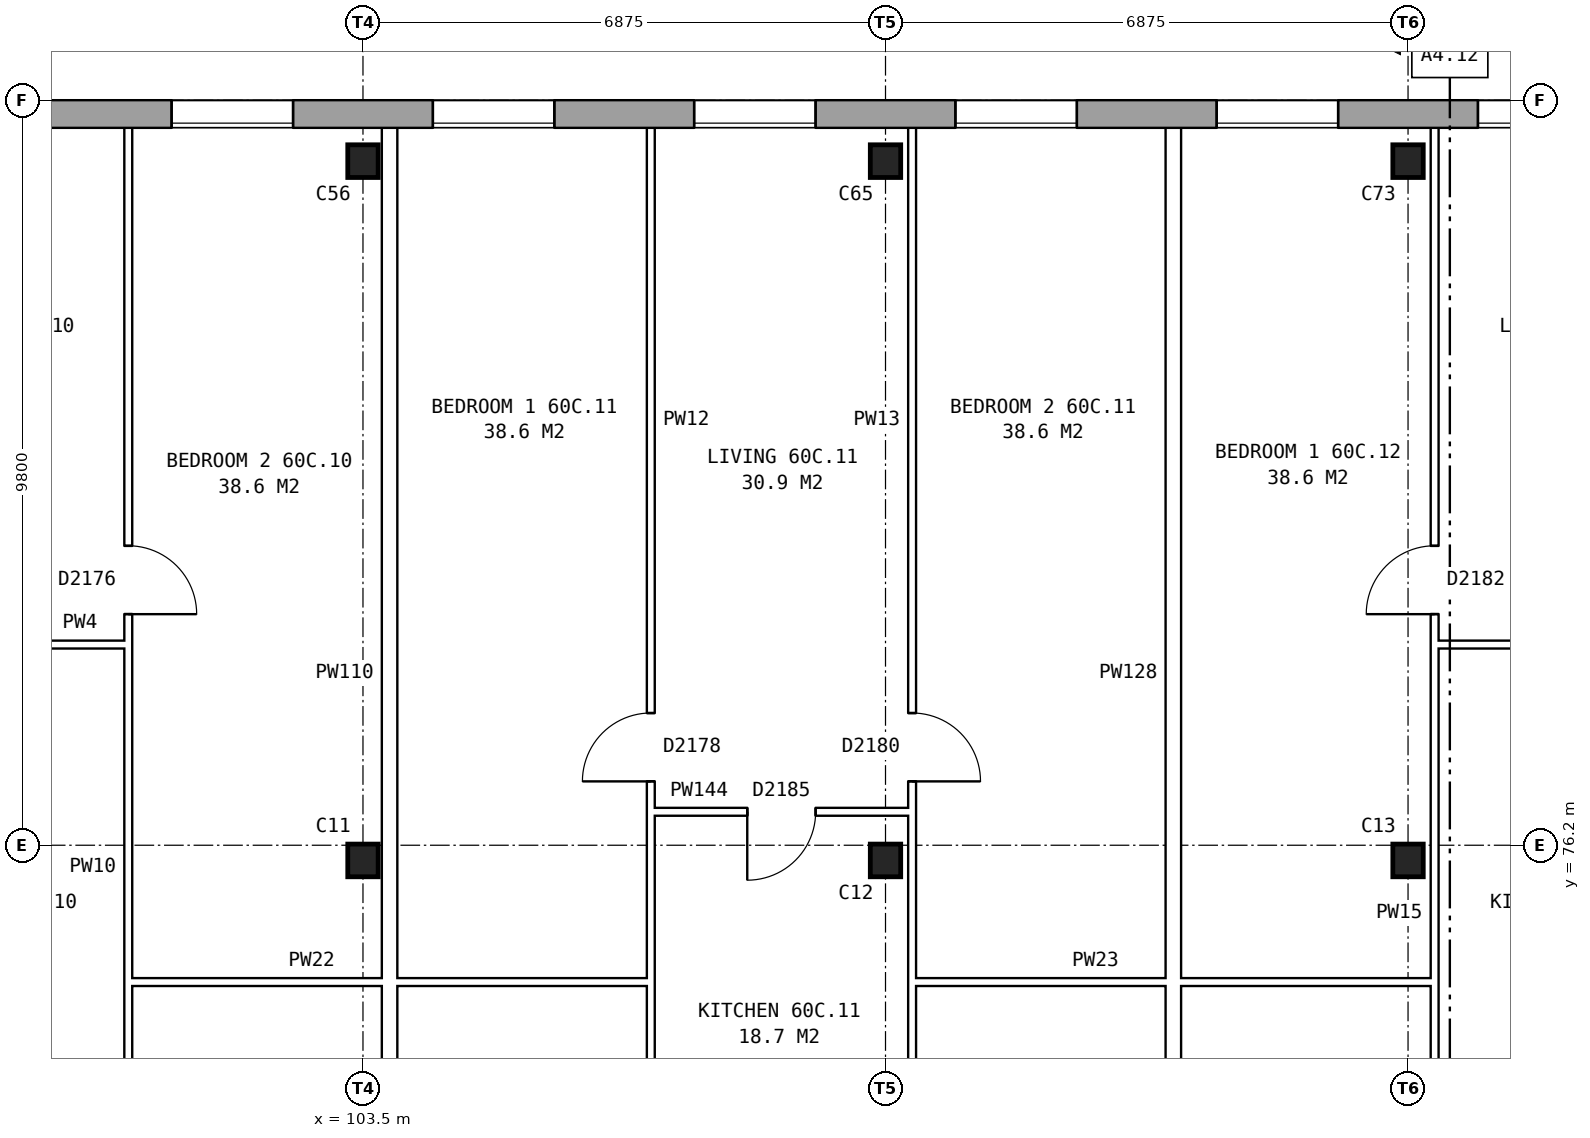
"""IFC4 building model, lengths in metres.
Left out: names, types, materials, properties, quantities, classifications, styles, units other than length and angle.
Written with IfcOpenShell. Run it as: python <this file> out.ifc"""

import sys

from ifc_helpers import new_model, si_unit, direction, frame, frame_2d, origin, origin_2d, place, context, subcontext, project, spatial, rectangle, i_section, extrude, element, fill, save


model = new_model("IFC4")
c1 = context("Model", 3, precision=1e-05, world=origin(), true_north=direction((0.0, 1.0)))
c2 = subcontext(c1, "Body", "Model", "MODEL_VIEW")
j1 = project(units=[si_unit("LENGTHUNIT", "METRE"), si_unit("PLANEANGLEUNIT", "RADIAN")], contexts=[c1])
p1 = place(None, origin())
s1 = spatial("IfcSite", under=j1, at=p1, CompositionType="ELEMENT")
p2 = place(p1, origin())
s2 = spatial("IfcBuilding", under=s1, at=p2, CompositionType="ELEMENT")
p3 = place(p2, frame((0.0, 0.0, 212.1)))
s3 = spatial("IfcBuildingStorey", under=s2, at=p3, CompositionType="ELEMENT", Elevation=212.1)
for number, where, z_axis, x_axis in (
    (1, (103.5, 76.0, 0.0), (0.0, 0.0, 1.0), (1.0, 0.0, 0.0)),
    (2, (110.375, 76.0, 0.0), (0.0, 0.0, 1.0), (1.0, 0.0, 0.0)),
    (3, (117.25, 76.0, 0.0), (0.0, 0.0, 1.0), (1.0, 0.0, 0.0)),
    (4, (103.5, 85.2, 0.0), (0.0, 0.0, 1.0), (1.0, 0.0, 0.0)),
    (5, (110.375, 85.2, 0.0), (0.0, 0.0, 1.0), (1.0, 0.0, 0.0)),
    (6, (117.25, 85.2, 0.0), (0.0, 0.0, 1.0), (1.0, 0.0, 0.0)),
):
    element("IfcColumn", number, at=place(p3, frame(where, z_axis=z_axis, x_axis=x_axis)), inside=s3, PredefinedType="COLUMN", context=c2, shape_type="SweptSolid", body=[
        extrude(i_section(OverallWidth=0.4, OverallDepth=0.43, WebThickness=0.04, FlangeThickness=0.04, at=origin_2d()), origin(), (0.0, 0.0, 1.0), 2.85),
    ])
p4 = place(p3, frame((131.05, 85.82, 0.0), z_axis=(0.0, 0.0, 1.0), x_axis=(-1.0, 0.0, 0.0)))
e7 = element("IfcWall", 7, at=p4, inside=s3, PredefinedType="STANDARD", context=c2, shape_type="SweptSolid", body=[
    extrude(rectangle(XDim=55.1, YDim=0.36, at=frame_2d((27.55, 0.0))), origin(), (0.0, 0.0, 1.0), 2.85),
])
p5 = place(p4, frame((0.969, 0.0, 0.8)))
e8 = element("IfcOpeningElement", 8, at=p5, cuts=e7, PredefinedType="OPENING", context=c2, shape_type="SweptSolid", body=[
    extrude(rectangle(XDim=1.6, YDim=1.8, at=frame_2d((0.8, 0.9))), frame((0.0, 0.19, 0.0), z_axis=(0.0, -1.0, 0.0), x_axis=(1.0, 0.0, 0.0)), (0.0, 0.0, 1.0), 0.38),
])
p6 = place(p4, frame((4.406, 0.0, 0.8)))
e9 = element("IfcOpeningElement", 9, at=p6, cuts=e7, PredefinedType="OPENING", context=c2, shape_type="SweptSolid", body=[
    extrude(rectangle(XDim=1.6, YDim=1.8, at=frame_2d((0.8, 0.9))), frame((0.0, 0.19, 0.0), z_axis=(0.0, -1.0, 0.0), x_axis=(1.0, 0.0, 0.0)), (0.0, 0.0, 1.0), 0.38),
])
p7 = place(p4, frame((7.844, 0.0, 0.8)))
e10 = element("IfcOpeningElement", 10, at=p7, cuts=e7, PredefinedType="OPENING", context=c2, shape_type="SweptSolid", body=[
    extrude(rectangle(XDim=1.6, YDim=1.8, at=frame_2d((0.8, 0.9))), frame((0.0, 0.19, 0.0), z_axis=(0.0, -1.0, 0.0), x_axis=(1.0, 0.0, 0.0)), (0.0, 0.0, 1.0), 0.38),
])
p8 = place(p4, frame((11.281, 0.0, 0.8)))
e11 = element("IfcOpeningElement", 11, at=p8, cuts=e7, PredefinedType="OPENING", context=c2, shape_type="SweptSolid", body=[
    extrude(rectangle(XDim=1.6, YDim=1.8, at=frame_2d((0.8, 0.9))), frame((0.0, 0.19, 0.0), z_axis=(0.0, -1.0, 0.0), x_axis=(1.0, 0.0, 0.0)), (0.0, 0.0, 1.0), 0.38),
])
p9 = place(p4, frame((14.719, 0.0, 0.8)))
e12 = element("IfcOpeningElement", 12, at=p9, cuts=e7, PredefinedType="OPENING", context=c2, shape_type="SweptSolid", body=[
    extrude(rectangle(XDim=1.6, YDim=1.8, at=frame_2d((0.8, 0.9))), frame((0.0, 0.19, 0.0), z_axis=(0.0, -1.0, 0.0), x_axis=(1.0, 0.0, 0.0)), (0.0, 0.0, 1.0), 0.38),
])
p10 = place(p4, frame((18.156, 0.0, 0.8)))
e13 = element("IfcOpeningElement", 13, at=p10, cuts=e7, PredefinedType="OPENING", context=c2, shape_type="SweptSolid", body=[
    extrude(rectangle(XDim=1.6, YDim=1.8, at=frame_2d((0.8, 0.9))), frame((0.0, 0.19, 0.0), z_axis=(0.0, -1.0, 0.0), x_axis=(1.0, 0.0, 0.0)), (0.0, 0.0, 1.0), 0.38),
])
p11 = place(p4, frame((21.594, 0.0, 0.8)))
e14 = element("IfcOpeningElement", 14, at=p11, cuts=e7, PredefinedType="OPENING", context=c2, shape_type="SweptSolid", body=[
    extrude(rectangle(XDim=1.6, YDim=1.8, at=frame_2d((0.8, 0.9))), frame((0.0, 0.19, 0.0), z_axis=(0.0, -1.0, 0.0), x_axis=(1.0, 0.0, 0.0)), (0.0, 0.0, 1.0), 0.38),
])
p12 = place(p4, frame((25.031, 0.0, 0.8)))
e15 = element("IfcOpeningElement", 15, at=p12, cuts=e7, PredefinedType="OPENING", context=c2, shape_type="SweptSolid", body=[
    extrude(rectangle(XDim=1.6, YDim=1.8, at=frame_2d((0.8, 0.9))), frame((0.0, 0.19, 0.0), z_axis=(0.0, -1.0, 0.0), x_axis=(1.0, 0.0, 0.0)), (0.0, 0.0, 1.0), 0.38),
])
p13 = place(p4, frame((28.469, 0.0, 0.8)))
e16 = element("IfcOpeningElement", 16, at=p13, cuts=e7, PredefinedType="OPENING", context=c2, shape_type="SweptSolid", body=[
    extrude(rectangle(XDim=1.6, YDim=1.8, at=frame_2d((0.8, 0.9))), frame((0.0, 0.19, 0.0), z_axis=(0.0, -1.0, 0.0), x_axis=(1.0, 0.0, 0.0)), (0.0, 0.0, 1.0), 0.38),
])
p14 = place(p4, frame((31.906, 0.0, 0.8)))
e17 = element("IfcOpeningElement", 17, at=p14, cuts=e7, PredefinedType="OPENING", context=c2, shape_type="SweptSolid", body=[
    extrude(rectangle(XDim=1.6, YDim=1.8, at=frame_2d((0.8, 0.9))), frame((0.0, 0.19, 0.0), z_axis=(0.0, -1.0, 0.0), x_axis=(1.0, 0.0, 0.0)), (0.0, 0.0, 1.0), 0.38),
])
p15 = place(p4, frame((35.344, 0.0, 0.8)))
e18 = element("IfcOpeningElement", 18, at=p15, cuts=e7, PredefinedType="OPENING", context=c2, shape_type="SweptSolid", body=[
    extrude(rectangle(XDim=1.6, YDim=1.8, at=frame_2d((0.8, 0.9))), frame((0.0, 0.19, 0.0), z_axis=(0.0, -1.0, 0.0), x_axis=(1.0, 0.0, 0.0)), (0.0, 0.0, 1.0), 0.38),
])
p16 = place(p4, frame((38.781, 0.0, 0.8)))
e19 = element("IfcOpeningElement", 19, at=p16, cuts=e7, PredefinedType="OPENING", context=c2, shape_type="SweptSolid", body=[
    extrude(rectangle(XDim=1.6, YDim=1.8, at=frame_2d((0.8, 0.9))), frame((0.0, 0.19, 0.0), z_axis=(0.0, -1.0, 0.0), x_axis=(1.0, 0.0, 0.0)), (0.0, 0.0, 1.0), 0.38),
])
p17 = place(p4, frame((42.219, 0.0, 0.8)))
e20 = element("IfcOpeningElement", 20, at=p17, cuts=e7, PredefinedType="OPENING", context=c2, shape_type="SweptSolid", body=[
    extrude(rectangle(XDim=1.6, YDim=1.8, at=frame_2d((0.8, 0.9))), frame((0.0, 0.19, 0.0), z_axis=(0.0, -1.0, 0.0), x_axis=(1.0, 0.0, 0.0)), (0.0, 0.0, 1.0), 0.38),
])
p18 = place(p4, frame((45.656, 0.0, 0.8)))
e21 = element("IfcOpeningElement", 21, at=p18, cuts=e7, PredefinedType="OPENING", context=c2, shape_type="SweptSolid", body=[
    extrude(rectangle(XDim=1.6, YDim=1.8, at=frame_2d((0.8, 0.9))), frame((0.0, 0.19, 0.0), z_axis=(0.0, -1.0, 0.0), x_axis=(1.0, 0.0, 0.0)), (0.0, 0.0, 1.0), 0.38),
])
p19 = place(p4, frame((49.094, 0.0, 0.8)))
e22 = element("IfcOpeningElement", 22, at=p19, cuts=e7, PredefinedType="OPENING", context=c2, shape_type="SweptSolid", body=[
    extrude(rectangle(XDim=1.6, YDim=1.8, at=frame_2d((0.8, 0.9))), frame((0.0, 0.19, 0.0), z_axis=(0.0, -1.0, 0.0), x_axis=(1.0, 0.0, 0.0)), (0.0, 0.0, 1.0), 0.38),
])
p20 = place(p4, frame((52.531, 0.0, 0.8)))
e23 = element("IfcOpeningElement", 23, at=p20, cuts=e7, PredefinedType="OPENING", context=c2, shape_type="SweptSolid", body=[
    extrude(rectangle(XDim=1.6, YDim=1.8, at=frame_2d((0.8, 0.9))), frame((0.0, 0.19, 0.0), z_axis=(0.0, -1.0, 0.0), x_axis=(1.0, 0.0, 0.0)), (0.0, 0.0, 1.0), 0.38),
])
for number, where, z_axis, x_axis in (
    (24, (100.412, 74.4, 0.0), (0.0, 0.0, 1.0), (1.0, 0.0, 0.0)),
    (25, (110.725, 74.4, 0.0), (0.0, 0.0, 1.0), (1.0, 0.0, 0.0)),
):
    element("IfcWall", number, at=place(p3, frame(where, z_axis=z_axis, x_axis=x_axis)), inside=s3, PredefinedType="PARTITIONING", context=c2, shape_type="SweptSolid", body=[
        extrude(rectangle(XDim=6.875, YDim=0.1, at=frame_2d((3.438, 0.0))), origin(), (0.0, 0.0, 1.0), 2.85),
    ])
p21 = place(p3, frame((107.287, 76.64, 0.0), z_axis=(0.0, 0.0, 1.0), x_axis=(1.0, 0.0, 0.0)))
e26 = element("IfcWall", 26, at=p21, inside=s3, PredefinedType="PARTITIONING", context=c2, shape_type="SweptSolid", body=[
    extrude(rectangle(XDim=3.438, YDim=0.1, at=frame_2d((1.719, 0.0))), origin(), (0.0, 0.0, 1.0), 2.85),
])
p22 = place(p21, frame((1.269, 0.0, 0.0)))
e27 = element("IfcOpeningElement", 27, at=p22, cuts=e26, PredefinedType="OPENING", context=c2, shape_type="SweptSolid", body=[
    extrude(rectangle(XDim=0.9, YDim=2.1, at=frame_2d((0.45, 1.05))), frame((0.0, 0.06, 0.0), z_axis=(0.0, -1.0, 0.0), x_axis=(1.0, 0.0, 0.0)), (0.0, 0.0, 1.0), 0.12),
])
p23 = place(p3, frame((96.975, 78.84, 0.0), z_axis=(0.0, 0.0, 1.0), x_axis=(1.0, 0.0, 0.0)))
e28 = element("IfcWall", 28, at=p23, inside=s3, PredefinedType="PARTITIONING", context=c2, shape_type="SweptSolid", body=[
    extrude(rectangle(XDim=3.437, YDim=0.1, at=frame_2d((1.719, 0.0))), origin(), (0.0, 0.0, 1.0), 2.85),
])
p24 = place(p23, frame((1.269, 0.0, 0.0)))
e29 = element("IfcOpeningElement", 29, at=p24, cuts=e28, PredefinedType="OPENING", context=c2, shape_type="SweptSolid", body=[
    extrude(rectangle(XDim=0.9, YDim=2.1, at=frame_2d((0.45, 1.05))), frame((0.0, 0.06, 0.0), z_axis=(0.0, -1.0, 0.0), x_axis=(1.0, 0.0, 0.0)), (0.0, 0.0, 1.0), 0.12),
])
p25 = place(p3, frame((117.6, 78.84, 0.0), z_axis=(0.0, 0.0, 1.0), x_axis=(1.0, 0.0, 0.0)))
e30 = element("IfcWall", 30, at=p25, inside=s3, PredefinedType="PARTITIONING", context=c2, shape_type="SweptSolid", body=[
    extrude(rectangle(XDim=3.437, YDim=0.1, at=frame_2d((1.719, 0.0))), origin(), (0.0, 0.0, 1.0), 2.85),
])
p26 = place(p25, frame((1.269, 0.0, 0.0)))
e31 = element("IfcOpeningElement", 31, at=p26, cuts=e30, PredefinedType="OPENING", context=c2, shape_type="SweptSolid", body=[
    extrude(rectangle(XDim=0.9, YDim=2.1, at=frame_2d((0.45, 1.05))), frame((0.0, 0.06, 0.0), z_axis=(0.0, -1.0, 0.0), x_axis=(1.0, 0.0, 0.0)), (0.0, 0.0, 1.0), 0.12),
])
p27 = place(p3, frame((100.412, 71.3, 0.0), z_axis=(0.0, 0.0, 1.0), x_axis=(0.0, 1.0, 0.0)))
e32 = element("IfcWall", 32, at=p27, inside=s3, PredefinedType="PARTITIONING", context=c2, shape_type="SweptSolid", body=[
    extrude(rectangle(XDim=14.34, YDim=0.1, at=frame_2d((7.17, 0.0))), origin(), (0.0, 0.0, 1.0), 2.85),
])
p28 = place(p27, frame((7.94, 0.0, 0.0)))
e33 = element("IfcOpeningElement", 33, at=p28, cuts=e32, PredefinedType="OPENING", context=c2, shape_type="SweptSolid", body=[
    extrude(rectangle(XDim=0.9, YDim=2.1, at=frame_2d((0.45, 1.05))), frame((0.0, 0.06, 0.0), z_axis=(0.0, -1.0, 0.0), x_axis=(1.0, 0.0, 0.0)), (0.0, 0.0, 1.0), 0.12),
])
p29 = place(p27, frame((0.4, 0.0, 0.0)))
e34 = element("IfcOpeningElement", 34, at=p29, cuts=e32, PredefinedType="OPENING", context=c2, shape_type="SweptSolid", body=[
    extrude(rectangle(XDim=0.9, YDim=2.1, at=frame_2d((0.45, 1.05))), frame((0.0, 0.06, 0.0), z_axis=(0.0, -1.0, 0.0), x_axis=(1.0, 0.0, 0.0)), (0.0, 0.0, 1.0), 0.12),
])
p30 = place(p3, frame((103.85, 71.3, 0.0), z_axis=(0.0, 0.0, 1.0), x_axis=(0.0, 1.0, 0.0)))
e35 = element("IfcWall", 35, at=p30, inside=s3, PredefinedType="PARTITIONING", context=c2, shape_type="SweptSolid", body=[
    extrude(rectangle(XDim=14.34, YDim=0.2, at=frame_2d((7.17, 0.0))), origin(), (0.0, 0.0, 1.0), 2.85),
])
p31 = place(p3, frame((107.287, 71.3, 0.0), z_axis=(0.0, 0.0, 1.0), x_axis=(0.0, 1.0, 0.0)))
e36 = element("IfcWall", 36, at=p31, inside=s3, PredefinedType="PARTITIONING", context=c2, shape_type="SweptSolid", body=[
    extrude(rectangle(XDim=14.34, YDim=0.1, at=frame_2d((7.17, 0.0))), origin(), (0.0, 0.0, 1.0), 2.85),
])
p32 = place(p31, frame((5.74, 0.0, 0.0)))
e37 = element("IfcOpeningElement", 37, at=p32, cuts=e36, PredefinedType="OPENING", context=c2, shape_type="SweptSolid", body=[
    extrude(rectangle(XDim=0.9, YDim=2.1, at=frame_2d((0.45, 1.05))), frame((0.0, 0.06, 0.0), z_axis=(0.0, -1.0, 0.0), x_axis=(1.0, 0.0, 0.0)), (0.0, 0.0, 1.0), 0.12),
])
p33 = place(p31, frame((0.4, 0.0, 0.0)))
e38 = element("IfcOpeningElement", 38, at=p33, cuts=e36, PredefinedType="OPENING", context=c2, shape_type="SweptSolid", body=[
    extrude(rectangle(XDim=0.9, YDim=2.1, at=frame_2d((0.45, 1.05))), frame((0.0, 0.06, 0.0), z_axis=(0.0, -1.0, 0.0), x_axis=(1.0, 0.0, 0.0)), (0.0, 0.0, 1.0), 0.12),
])
p34 = place(p3, frame((110.725, 71.3, 0.0), z_axis=(0.0, 0.0, 1.0), x_axis=(0.0, 1.0, 0.0)))
e39 = element("IfcWall", 39, at=p34, inside=s3, PredefinedType="PARTITIONING", context=c2, shape_type="SweptSolid", body=[
    extrude(rectangle(XDim=14.34, YDim=0.1, at=frame_2d((7.17, 0.0))), origin(), (0.0, 0.0, 1.0), 2.85),
])
p35 = place(p34, frame((5.74, 0.0, 0.0)))
e40 = element("IfcOpeningElement", 40, at=p35, cuts=e39, PredefinedType="OPENING", context=c2, shape_type="SweptSolid", body=[
    extrude(rectangle(XDim=0.9, YDim=2.1, at=frame_2d((0.45, 1.05))), frame((0.0, 0.06, 0.0), z_axis=(0.0, -1.0, 0.0), x_axis=(1.0, 0.0, 0.0)), (0.0, 0.0, 1.0), 0.12),
])
p36 = place(p34, frame((0.4, 0.0, 0.0)))
e41 = element("IfcOpeningElement", 41, at=p36, cuts=e39, PredefinedType="OPENING", context=c2, shape_type="SweptSolid", body=[
    extrude(rectangle(XDim=0.9, YDim=2.1, at=frame_2d((0.45, 1.05))), frame((0.0, 0.06, 0.0), z_axis=(0.0, -1.0, 0.0), x_axis=(1.0, 0.0, 0.0)), (0.0, 0.0, 1.0), 0.12),
])
p37 = place(p3, frame((114.162, 71.3, 0.0), z_axis=(0.0, 0.0, 1.0), x_axis=(0.0, 1.0, 0.0)))
e42 = element("IfcWall", 42, at=p37, inside=s3, PredefinedType="PARTITIONING", context=c2, shape_type="SweptSolid", body=[
    extrude(rectangle(XDim=14.34, YDim=0.2, at=frame_2d((7.17, 0.0))), origin(), (0.0, 0.0, 1.0), 2.85),
])
p38 = place(p3, frame((117.6, 71.3, 0.0), z_axis=(0.0, 0.0, 1.0), x_axis=(0.0, 1.0, 0.0)))
e43 = element("IfcWall", 43, at=p38, inside=s3, PredefinedType="PARTITIONING", context=c2, shape_type="SweptSolid", body=[
    extrude(rectangle(XDim=14.34, YDim=0.1, at=frame_2d((7.17, 0.0))), origin(), (0.0, 0.0, 1.0), 2.85),
])
p39 = place(p38, frame((7.94, 0.0, 0.0)))
e44 = element("IfcOpeningElement", 44, at=p39, cuts=e43, PredefinedType="OPENING", context=c2, shape_type="SweptSolid", body=[
    extrude(rectangle(XDim=0.9, YDim=2.1, at=frame_2d((0.45, 1.05))), frame((0.0, 0.06, 0.0), z_axis=(0.0, -1.0, 0.0), x_axis=(1.0, 0.0, 0.0)), (0.0, 0.0, 1.0), 0.12),
])
p40 = place(p38, frame((0.4, 0.0, 0.0)))
e45 = element("IfcOpeningElement", 45, at=p40, cuts=e43, PredefinedType="OPENING", context=c2, shape_type="SweptSolid", body=[
    extrude(rectangle(XDim=0.9, YDim=2.1, at=frame_2d((0.45, 1.05))), frame((0.0, 0.06, 0.0), z_axis=(0.0, -1.0, 0.0), x_axis=(1.0, 0.0, 0.0)), (0.0, 0.0, 1.0), 0.12),
])
p41 = place(p8, origin())
e46 = element("IfcWindow", 46, at=p41, inside=s3, PartitioningType="SINGLE_PANEL", PredefinedType="WINDOW", context=c2, shape_type="SweptSolid", body=[
    extrude(rectangle(XDim=1.6, YDim=1.8, at=frame_2d((0.8, 0.9))), frame((0.0, 0.15, 0.0), z_axis=(0.0, -1.0, 0.0), x_axis=(1.0, 0.0, 0.0)), (0.0, 0.0, 1.0), 0.06),
])
fill(e11, e46)
p42 = place(p9, origin())
e47 = element("IfcWindow", 47, at=p42, inside=s3, PartitioningType="SINGLE_PANEL", PredefinedType="WINDOW", context=c2, shape_type="SweptSolid", body=[
    extrude(rectangle(XDim=1.6, YDim=1.8, at=frame_2d((0.8, 0.9))), frame((0.0, 0.15, 0.0), z_axis=(0.0, -1.0, 0.0), x_axis=(1.0, 0.0, 0.0)), (0.0, 0.0, 1.0), 0.06),
])
fill(e12, e47)
p43 = place(p10, origin())
e48 = element("IfcWindow", 48, at=p43, inside=s3, PartitioningType="SINGLE_PANEL", PredefinedType="WINDOW", context=c2, shape_type="SweptSolid", body=[
    extrude(rectangle(XDim=1.6, YDim=1.8, at=frame_2d((0.8, 0.9))), frame((0.0, 0.15, 0.0), z_axis=(0.0, -1.0, 0.0), x_axis=(1.0, 0.0, 0.0)), (0.0, 0.0, 1.0), 0.06),
])
fill(e13, e48)
p44 = place(p11, origin())
e49 = element("IfcWindow", 49, at=p44, inside=s3, PartitioningType="SINGLE_PANEL", PredefinedType="WINDOW", context=c2, shape_type="SweptSolid", body=[
    extrude(rectangle(XDim=1.6, YDim=1.8, at=frame_2d((0.8, 0.9))), frame((0.0, 0.15, 0.0), z_axis=(0.0, -1.0, 0.0), x_axis=(1.0, 0.0, 0.0)), (0.0, 0.0, 1.0), 0.06),
])
fill(e14, e49)
p45 = place(p12, origin())
e50 = element("IfcWindow", 50, at=p45, inside=s3, PartitioningType="SINGLE_PANEL", PredefinedType="WINDOW", context=c2, shape_type="SweptSolid", body=[
    extrude(rectangle(XDim=1.6, YDim=1.8, at=frame_2d((0.8, 0.9))), frame((0.0, 0.15, 0.0), z_axis=(0.0, -1.0, 0.0), x_axis=(1.0, 0.0, 0.0)), (0.0, 0.0, 1.0), 0.06),
])
fill(e15, e50)
p46 = place(p13, origin())
e51 = element("IfcWindow", 51, at=p46, inside=s3, PartitioningType="SINGLE_PANEL", PredefinedType="WINDOW", context=c2, shape_type="SweptSolid", body=[
    extrude(rectangle(XDim=1.6, YDim=1.8, at=frame_2d((0.8, 0.9))), frame((0.0, 0.15, 0.0), z_axis=(0.0, -1.0, 0.0), x_axis=(1.0, 0.0, 0.0)), (0.0, 0.0, 1.0), 0.06),
])
fill(e16, e51)
p47 = place(p28, frame((0.9, 0.0, 0.0), z_axis=(0.0, 0.0, 1.0), x_axis=(-1.0, 0.0, 0.0)))
e52 = element("IfcDoor", 52, at=p47, inside=s3, OperationType="SINGLE_SWING_RIGHT", PredefinedType="DOOR", context=c2, shape_type="SweptSolid", body=[
    extrude(rectangle(XDim=0.9, YDim=2.1, at=frame_2d((0.45, 1.05))), frame((0.0, 0.025, 0.0), z_axis=(0.0, -1.0, 0.0), x_axis=(1.0, 0.0, 0.0)), (0.0, 0.0, 1.0), 0.05),
])
fill(e33, e52)
p48 = place(p32, origin())
e53 = element("IfcDoor", 53, at=p48, inside=s3, OperationType="SINGLE_SWING_LEFT", PredefinedType="DOOR", context=c2, shape_type="SweptSolid", body=[
    extrude(rectangle(XDim=0.9, YDim=2.1, at=frame_2d((0.45, 1.05))), frame((0.0, 0.025, 0.0), z_axis=(0.0, -1.0, 0.0), x_axis=(1.0, 0.0, 0.0)), (0.0, 0.0, 1.0), 0.05),
])
fill(e37, e53)
p49 = place(p35, frame((0.9, 0.0, 0.0), z_axis=(0.0, 0.0, 1.0), x_axis=(-1.0, 0.0, 0.0)))
e54 = element("IfcDoor", 54, at=p49, inside=s3, OperationType="SINGLE_SWING_RIGHT", PredefinedType="DOOR", context=c2, shape_type="SweptSolid", body=[
    extrude(rectangle(XDim=0.9, YDim=2.1, at=frame_2d((0.45, 1.05))), frame((0.0, 0.025, 0.0), z_axis=(0.0, -1.0, 0.0), x_axis=(1.0, 0.0, 0.0)), (0.0, 0.0, 1.0), 0.05),
])
fill(e40, e54)
p50 = place(p22, frame((0.9, 0.0, 0.0), z_axis=(0.0, 0.0, 1.0), x_axis=(-1.0, 0.0, 0.0)))
e55 = element("IfcDoor", 55, at=p50, inside=s3, OperationType="SINGLE_SWING_RIGHT", PredefinedType="DOOR", context=c2, shape_type="SweptSolid", body=[
    extrude(rectangle(XDim=0.9, YDim=2.1, at=frame_2d((0.45, 1.05))), frame((0.0, 0.025, 0.0), z_axis=(0.0, -1.0, 0.0), x_axis=(1.0, 0.0, 0.0)), (0.0, 0.0, 1.0), 0.05),
])
fill(e27, e55)
p51 = place(p39, origin())
e56 = element("IfcDoor", 56, at=p51, inside=s3, OperationType="SINGLE_SWING_LEFT", PredefinedType="DOOR", context=c2, shape_type="SweptSolid", body=[
    extrude(rectangle(XDim=0.9, YDim=2.1, at=frame_2d((0.45, 1.05))), frame((0.0, 0.025, 0.0), z_axis=(0.0, -1.0, 0.0), x_axis=(1.0, 0.0, 0.0)), (0.0, 0.0, 1.0), 0.05),
])
fill(e44, e56)
save(model, sys.argv[1])
